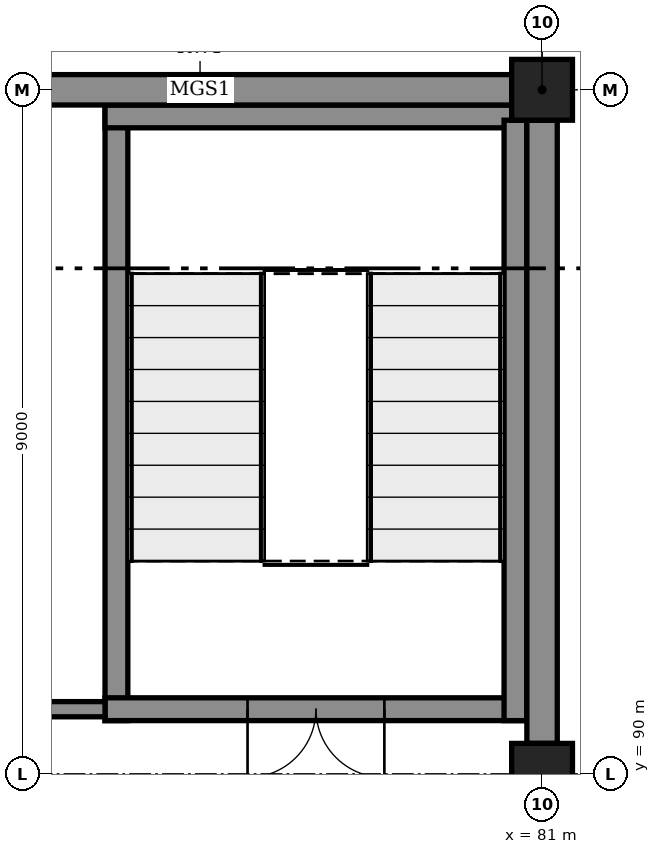
"""IFC4 building model, lengths in metres.
Left out: names, types, materials, properties, quantities, classifications, styles, units other than length and angle.
Written with IfcOpenShell. Run it as: python <this file> out.ifc"""

import sys

from ifc_helpers import new_model, si_unit, direction, frame, frame_2d, origin, origin_2d, place, context, subcontext, project, spatial, rectangle, extrude, element, fill, save


model = new_model("IFC4")
c1 = context("Model", 3, precision=1e-05, world=origin(), true_north=direction((0.0, 1.0)))
c2 = subcontext(c1, "Body", "Model", "MODEL_VIEW")
j1 = project(units=[si_unit("LENGTHUNIT", "METRE"), si_unit("PLANEANGLEUNIT", "RADIAN")], contexts=[c1])
p1 = place(None, origin())
s1 = spatial("IfcSite", under=j1, at=p1, CompositionType="ELEMENT")
p2 = place(p1, origin())
s2 = spatial("IfcBuilding", under=s1, at=p2, CompositionType="ELEMENT")
p3 = place(p2, origin())
s3 = spatial("IfcBuildingStorey", under=s2, at=p3, CompositionType="ELEMENT", Elevation=0.0)
for number, where, z_axis, x_axis in (
    (1, (81.0, 90.0, -0.3), (0.0, 0.0, 1.0), (1.0, 0.0, 0.0)),
    (2, (81.0, 99.0, -0.3), (0.0, 0.0, 1.0), (1.0, 0.0, 0.0)),
):
    element("IfcColumn", number, at=place(p3, frame(where, z_axis=z_axis, x_axis=x_axis)), inside=s3, PredefinedType="COLUMN", context=c2, shape_type="SweptSolid", body=[
        extrude(rectangle(XDim=0.8, YDim=0.8, at=origin_2d()), origin(), (0.0, 0.0, 1.0), 6.3),
    ])
for number, where, z_axis, x_axis in (
    (3, (72.4, 99.0, 0.0), (0.0, 0.0, 1.0), (1.0, 0.0, 0.0)),
    (4, (81.0, 90.4, 0.0), (0.0, 0.0, 1.0), (0.0, 1.0, 0.0)),
):
    element("IfcWall", number, at=place(p3, frame(where, z_axis=z_axis, x_axis=x_axis)), inside=s3, PredefinedType="SOLIDWALL", context=c2, shape_type="SweptSolid", body=[
        extrude(rectangle(XDim=8.2, YDim=0.4, at=frame_2d((4.1, 0.0))), origin(), (0.0, 0.0, 1.0), 4.82),
    ])
p4 = place(p3, frame((80.6, 98.65, 0.0), z_axis=(0.0, 0.0, 1.0), x_axis=(-1.0, 0.0, 0.0)))
e5 = element("IfcWall", 5, at=p4, inside=s3, PredefinedType="SOLIDWALL", context=c2, shape_type="SweptSolid", body=[
    extrude(rectangle(XDim=5.35, YDim=0.3, at=frame_2d((2.675, 0.0))), origin(), (0.0, 0.0, 1.0), 5.72),
])
p5 = place(p3, frame((80.8, 90.85, 0.0), z_axis=(0.0, 0.0, 1.0), x_axis=(-1.0, 0.0, 0.0)))
e6 = element("IfcWall", 6, at=p5, inside=s3, PredefinedType="SOLIDWALL", context=c2, shape_type="SweptSolid", body=[
    extrude(rectangle(XDim=5.55, YDim=0.3, at=frame_2d((2.775, 0.0))), origin(), (0.0, 0.0, 1.0), 5.72),
])
p6 = place(p5, frame((1.875, 0.0, 0.0)))
e7 = element("IfcOpeningElement", 7, at=p6, cuts=e6, PredefinedType="OPENING", context=c2, shape_type="SweptSolid", body=[
    extrude(rectangle(XDim=1.8, YDim=2.4, at=frame_2d((0.9, 1.2))), frame((0.0, 0.16, 0.0), z_axis=(0.0, -1.0, 0.0), x_axis=(1.0, 0.0, 0.0)), (0.0, 0.0, 1.0), 0.32),
])
p7 = place(p3, frame((80.65, 98.6, 0.0), z_axis=(0.0, 0.0, 1.0), x_axis=(0.0, -1.0, 0.0)))
e8 = element("IfcWall", 8, at=p7, inside=s3, PredefinedType="SOLIDWALL", context=c2, shape_type="SweptSolid", body=[
    extrude(rectangle(XDim=7.9, YDim=0.3, at=frame_2d((3.95, 0.0))), origin(), (0.0, 0.0, 1.0), 5.72),
])
p8 = place(p3, frame((75.4, 98.8, 0.0), z_axis=(0.0, 0.0, 1.0), x_axis=(0.0, -1.0, 0.0)))
e9 = element("IfcWall", 9, at=p8, inside=s3, PredefinedType="SOLIDWALL", context=c2, shape_type="SweptSolid", body=[
    extrude(rectangle(XDim=8.1, YDim=0.3, at=frame_2d((4.05, 0.0))), origin(), (0.0, 0.0, 1.0), 5.72),
])
p9 = place(p3, frame((75.25, 90.85, 0.0), z_axis=(0.0, 0.0, 1.0), x_axis=(-1.0, 0.0, 0.0)))
e10 = element("IfcWall", 10, at=p9, inside=s3, PredefinedType="PARTITIONING", context=c2, shape_type="SweptSolid", body=[
    extrude(rectangle(XDim=6.85, YDim=0.2, at=frame_2d((3.425, 0.0))), origin(), (0.0, 0.0, 1.0), 5.72),
])
p10 = place(p9, frame((1.15, 0.0, 0.0)))
e11 = element("IfcOpeningElement", 11, at=p10, cuts=e10, PredefinedType="OPENING", context=c2, shape_type="SweptSolid", body=[
    extrude(rectangle(XDim=0.9, YDim=2.1, at=frame_2d((0.45, 1.05))), frame((0.0, 0.11, 0.0), z_axis=(0.0, -1.0, 0.0), x_axis=(1.0, 0.0, 0.0)), (0.0, 0.0, 1.0), 0.22),
])
p11 = place(p6, origin())
e12 = element("IfcDoor", 12, at=p11, inside=s3, OperationType="DOUBLE_DOOR_SINGLE_SWING", PredefinedType="DOOR", context=c2, shape_type="SweptSolid", body=[
    extrude(rectangle(XDim=1.8, YDim=2.4, at=frame_2d((0.9, 1.2))), frame((0.0, 0.025, 0.0), z_axis=(0.0, -1.0, 0.0), x_axis=(1.0, 0.0, 0.0)), (0.0, 0.0, 1.0), 0.05),
])
fill(e7, e12)
save(model, sys.argv[1])
